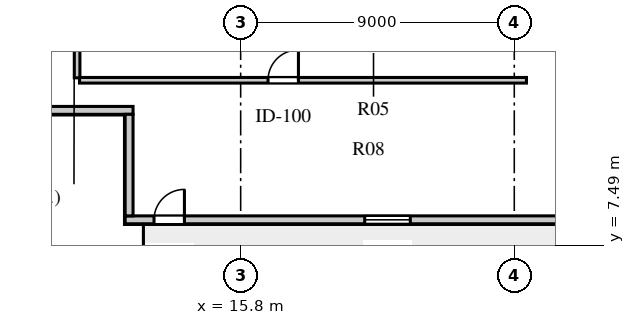
"""IFC4 building model, lengths in metres.
Left out: names, types, materials, properties, quantities, classifications, styles, units other than length and angle.
Written with IfcOpenShell. Run it as: python <this file> out.ifc"""

import sys

from ifc_helpers import new_model, si_unit, direction, frame, frame_2d, origin, place, context, subcontext, project, spatial, rectangle, extrude, element, fill, save


model = new_model("IFC4")
c1 = context("Model", 3, precision=1e-05, world=origin(), true_north=direction((0.0, 1.0)))
c2 = subcontext(c1, "Body", "Model", "MODEL_VIEW")
j1 = project(units=[si_unit("LENGTHUNIT", "METRE"), si_unit("PLANEANGLEUNIT", "RADIAN")], contexts=[c1])
p1 = place(None, origin())
s1 = spatial("IfcSite", under=j1, at=p1, CompositionType="ELEMENT")
p2 = place(p1, origin())
s2 = spatial("IfcBuilding", under=s1, at=p2, CompositionType="ELEMENT")
p3 = place(p2, frame((0.0, 0.0, 82.0)))
s3 = spatial("IfcBuildingStorey", under=s2, at=p3, CompositionType="ELEMENT", Elevation=82.0)
p4 = place(p3, frame((12.0, 8.33, 0.0), z_axis=(0.0, 0.0, 1.0), x_axis=(1.0, 0.0, 0.0)))
e1 = element("IfcWall", 1, at=p4, inside=s3, PredefinedType="SOLIDWALL", context=c2, shape_type="SweptSolid", body=[
    extrude(rectangle(XDim=34.6, YDim=0.26, at=frame_2d((17.3, 0.0))), origin(), (0.0, 0.0, 1.0), 3.74),
])
p5 = place(p4, frame((0.95, 0.0, 0.0)))
e2 = element("IfcOpeningElement", 2, at=p5, cuts=e1, PredefinedType="OPENING", context=c2, shape_type="SweptSolid", body=[
    extrude(rectangle(XDim=1.0, YDim=2.05, at=frame_2d((0.5, 1.025))), frame((0.0, 0.14, 0.0), z_axis=(0.0, -1.0, 0.0), x_axis=(1.0, 0.0, 0.0)), (0.0, 0.0, 1.0), 0.28),
])
p6 = place(p4, frame((7.88, 0.0, 0.8)))
e3 = element("IfcOpeningElement", 3, at=p6, cuts=e1, PredefinedType="OPENING", context=c2, shape_type="SweptSolid", body=[
    extrude(rectangle(XDim=1.5, YDim=2.0, at=frame_2d((0.75, 1.0))), frame((0.0, 0.14, 0.0), z_axis=(0.0, -1.0, 0.0), x_axis=(1.0, 0.0, 0.0)), (0.0, 0.0, 1.0), 0.28),
])
p7 = place(p4, frame((16.15, 0.0, 0.8)))
e4 = element("IfcOpeningElement", 4, at=p7, cuts=e1, PredefinedType="OPENING", context=c2, shape_type="SweptSolid", body=[
    extrude(rectangle(XDim=1.2, YDim=1.75, at=frame_2d((0.6, 0.875))), frame((0.0, 0.14, 0.0), z_axis=(0.0, -1.0, 0.0), x_axis=(1.0, 0.0, 0.0)), (0.0, 0.0, 1.0), 0.28),
])
p8 = place(p4, frame((18.45, 0.0, 0.8)))
e5 = element("IfcOpeningElement", 5, at=p8, cuts=e1, PredefinedType="OPENING", context=c2, shape_type="SweptSolid", body=[
    extrude(rectangle(XDim=1.2, YDim=1.75, at=frame_2d((0.6, 0.875))), frame((0.0, 0.14, 0.0), z_axis=(0.0, -1.0, 0.0), x_axis=(1.0, 0.0, 0.0)), (0.0, 0.0, 1.0), 0.28),
])
p9 = place(p4, frame((20.75, 0.0, 0.8)))
e6 = element("IfcOpeningElement", 6, at=p9, cuts=e1, PredefinedType="OPENING", context=c2, shape_type="SweptSolid", body=[
    extrude(rectangle(XDim=1.2, YDim=1.75, at=frame_2d((0.6, 0.875))), frame((0.0, 0.14, 0.0), z_axis=(0.0, -1.0, 0.0), x_axis=(1.0, 0.0, 0.0)), (0.0, 0.0, 1.0), 0.28),
])
p10 = place(p4, frame((29.63, 0.0, 0.8)))
e7 = element("IfcOpeningElement", 7, at=p10, cuts=e1, PredefinedType="OPENING", context=c2, shape_type="SweptSolid", body=[
    extrude(rectangle(XDim=1.35, YDim=1.9, at=frame_2d((0.675, 0.95))), frame((0.0, 0.14, 0.0), z_axis=(0.0, -1.0, 0.0), x_axis=(1.0, 0.0, 0.0)), (0.0, 0.0, 1.0), 0.28),
])
p11 = place(p3, frame((8.4, 11.93, 0.0), z_axis=(0.0, 0.0, 1.0), x_axis=(1.0, 0.0, 0.0)))
e8 = element("IfcWall", 8, at=p11, inside=s3, PredefinedType="SOLIDWALL", context=c2, shape_type="SweptSolid", body=[
    extrude(rectangle(XDim=3.86, YDim=0.26, at=frame_2d((1.93, 0.0))), origin(), (0.0, 0.0, 1.0), 3.74),
])
p12 = place(p3, frame((12.13, 11.8, 0.0), z_axis=(0.0, 0.0, 1.0), x_axis=(0.0, -1.0, 0.0)))
e9 = element("IfcWall", 9, at=p12, inside=s3, PredefinedType="SOLIDWALL", context=c2, shape_type="SweptSolid", body=[
    extrude(rectangle(XDim=3.34, YDim=0.26, at=frame_2d((1.67, 0.0))), origin(), (0.0, 0.0, 1.0), 3.74),
])
p13 = place(p3, frame((10.42, 13.0, 0.0), z_axis=(0.0, 0.0, 1.0), x_axis=(0.0, 1.0, 0.0)))
e10 = element("IfcWall", 10, at=p13, inside=s3, PredefinedType="SOLIDWALL", context=c2, shape_type="SweptSolid", body=[
    extrude(rectangle(XDim=31.2, YDim=0.185, at=frame_2d((15.6, 0.0))), origin(), (0.0, 0.0, 1.0), 3.74),
])
p14 = place(p13, frame((3.95, 0.0, 0.0)))
e11 = element("IfcOpeningElement", 11, at=p14, cuts=e10, PredefinedType="OPENING", context=c2, shape_type="SweptSolid", body=[
    extrude(rectangle(XDim=0.95, YDim=2.08, at=frame_2d((0.475, 1.04))), frame((0.0, 0.103, 0.0), z_axis=(0.0, -1.0, 0.0), x_axis=(1.0, 0.0, 0.0)), (0.0, 0.0, 1.0), 0.205),
])
p15 = place(p13, frame((8.5, 0.0, 0.0)))
e12 = element("IfcOpeningElement", 12, at=p15, cuts=e10, PredefinedType="OPENING", context=c2, shape_type="SweptSolid", body=[
    extrude(rectangle(XDim=0.95, YDim=2.08, at=frame_2d((0.475, 1.04))), frame((0.0, 0.103, 0.0), z_axis=(0.0, -1.0, 0.0), x_axis=(1.0, 0.0, 0.0)), (0.0, 0.0, 1.0), 0.205),
])
p16 = place(p13, frame((13.45, 0.0, 0.0)))
e13 = element("IfcOpeningElement", 13, at=p16, cuts=e10, PredefinedType="OPENING", context=c2, shape_type="SweptSolid", body=[
    extrude(rectangle(XDim=0.95, YDim=2.08, at=frame_2d((0.475, 1.04))), frame((0.0, 0.103, 0.0), z_axis=(0.0, -1.0, 0.0), x_axis=(1.0, 0.0, 0.0)), (0.0, 0.0, 1.0), 0.205),
])
p17 = place(p13, frame((18.45, 0.0, 0.0)))
e14 = element("IfcOpeningElement", 14, at=p17, cuts=e10, PredefinedType="OPENING", context=c2, shape_type="SweptSolid", body=[
    extrude(rectangle(XDim=0.95, YDim=2.08, at=frame_2d((0.475, 1.04))), frame((0.0, 0.103, 0.0), z_axis=(0.0, -1.0, 0.0), x_axis=(1.0, 0.0, 0.0)), (0.0, 0.0, 1.0), 0.205),
])
p18 = place(p13, frame((23.05, 0.0, 0.0)))
e15 = element("IfcOpeningElement", 15, at=p18, cuts=e10, PredefinedType="OPENING", context=c2, shape_type="SweptSolid", body=[
    extrude(rectangle(XDim=0.95, YDim=2.08, at=frame_2d((0.475, 1.04))), frame((0.0, 0.103, 0.0), z_axis=(0.0, -1.0, 0.0), x_axis=(1.0, 0.0, 0.0)), (0.0, 0.0, 1.0), 0.205),
])
p19 = place(p13, frame((26.8, 0.0, 0.0)))
e16 = element("IfcOpeningElement", 16, at=p19, cuts=e10, PredefinedType="OPENING", context=c2, shape_type="SweptSolid", body=[
    extrude(rectangle(XDim=0.95, YDim=2.08, at=frame_2d((0.475, 1.04))), frame((0.0, 0.103, 0.0), z_axis=(0.0, -1.0, 0.0), x_axis=(1.0, 0.0, 0.0)), (0.0, 0.0, 1.0), 0.205),
])
p20 = place(p3, frame((10.5, 12.92, 0.0), z_axis=(0.0, 0.0, 1.0), x_axis=(1.0, 0.0, 0.0)))
e17 = element("IfcWall", 17, at=p20, inside=s3, PredefinedType="SOLIDWALL", context=c2, shape_type="SweptSolid", body=[
    extrude(rectangle(XDim=14.7, YDim=0.185, at=frame_2d((7.35, 0.0))), origin(), (0.0, 0.0, 1.0), 3.74),
])
p21 = place(p20, frame((6.2, 0.0, 0.0)))
e18 = element("IfcOpeningElement", 18, at=p21, cuts=e17, PredefinedType="OPENING", context=c2, shape_type="SweptSolid", body=[
    extrude(rectangle(XDim=1.0, YDim=2.08, at=frame_2d((0.5, 1.04))), frame((0.0, 0.103, 0.0), z_axis=(0.0, -1.0, 0.0), x_axis=(1.0, 0.0, 0.0)), (0.0, 0.0, 1.0), 0.205),
])
p22 = place(p5, frame((1.0, 0.0, 0.0), z_axis=(0.0, 0.0, 1.0), x_axis=(-1.0, 0.0, 0.0)))
e19 = element("IfcDoor", 19, at=p22, inside=s3, OperationType="SINGLE_SWING_LEFT", PredefinedType="DOOR", context=c2, shape_type="SweptSolid", body=[
    extrude(rectangle(XDim=1.0, YDim=2.05, at=frame_2d((0.5, 1.025))), frame((0.0, 0.025, 0.0), z_axis=(0.0, -1.0, 0.0), x_axis=(1.0, 0.0, 0.0)), (0.0, 0.0, 1.0), 0.05),
])
fill(e2, e19)
p23 = place(p6, origin())
e20 = element("IfcWindow", 20, at=p23, inside=s3, PartitioningType="SINGLE_PANEL", PredefinedType="WINDOW", context=c2, shape_type="SweptSolid", body=[
    extrude(rectangle(XDim=1.5, YDim=2.0, at=frame_2d((0.75, 1.0))), frame((0.0, 0.03, 0.0), z_axis=(0.0, -1.0, 0.0), x_axis=(1.0, 0.0, 0.0)), (0.0, 0.0, 1.0), 0.06),
])
fill(e3, e20)
p24 = place(p21, frame((1.0, 0.0, 0.0), z_axis=(0.0, 0.0, 1.0), x_axis=(-1.0, 0.0, 0.0)))
e21 = element("IfcDoor", 21, at=p24, inside=s3, OperationType="SINGLE_SWING_LEFT", PredefinedType="DOOR", context=c2, shape_type="SweptSolid", body=[
    extrude(rectangle(XDim=1.0, YDim=2.08, at=frame_2d((0.5, 1.04))), frame((0.0, 0.025, 0.0), z_axis=(0.0, -1.0, 0.0), x_axis=(1.0, 0.0, 0.0)), (0.0, 0.0, 1.0), 0.05),
])
fill(e18, e21)
save(model, sys.argv[1])
